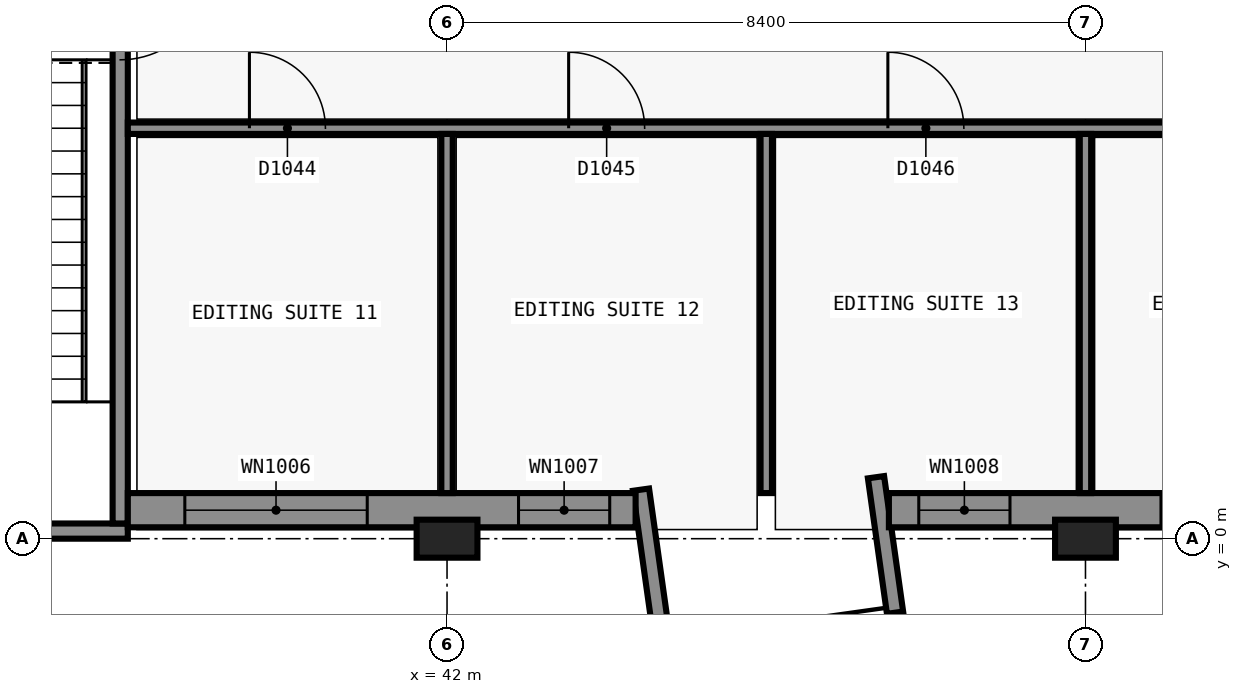
"""IFC4 building model, lengths in metres.
Left out: names, types, materials, properties, quantities, classifications, styles, units other than length and angle.
Written with IfcOpenShell. Run it as: python <this file> out.ifc"""

import sys

from ifc_helpers import new_model, si_unit, direction, frame, frame_2d, origin, origin_2d, place, context, subcontext, project, spatial, rectangle, extrude, element, fill, save


model = new_model("IFC4")
c1 = context("Model", 3, precision=1e-05, world=origin(), true_north=direction((0.0, 1.0)))
c2 = subcontext(c1, "Body", "Model", "MODEL_VIEW")
j1 = project(units=[si_unit("LENGTHUNIT", "METRE"), si_unit("PLANEANGLEUNIT", "RADIAN")], contexts=[c1])
p1 = place(None, origin())
s1 = spatial("IfcSite", under=j1, at=p1, CompositionType="ELEMENT")
p2 = place(p1, origin())
s2 = spatial("IfcBuilding", under=s1, at=p2, CompositionType="ELEMENT")
p3 = place(p2, frame((0.0, 0.0, 5.4)))
s3 = spatial("IfcBuildingStorey", under=s2, at=p3, CompositionType="ELEMENT", Elevation=5.4)
p4 = place(p3, frame((37.8, 0.1, 0.0), z_axis=(0.0, 0.0, 1.0), x_axis=(-1.0, 0.0, 0.0)))
e1 = element("IfcWall", 1, at=p4, inside=s3, PredefinedType="SHEAR", context=c2, shape_type="SweptSolid", body=[
    extrude(rectangle(XDim=3.9, YDim=0.2, at=frame_2d((1.95, 0.0))), origin(), (0.0, 0.0, 1.0), 4.8),
])
p5 = place(p3, frame((37.7, 8.4, 0.0), z_axis=(0.0, 0.0, 1.0), x_axis=(0.0, -1.0, 0.0)))
e2 = element("IfcWall", 2, at=p5, inside=s3, PredefinedType="SHEAR", context=c2, shape_type="SweptSolid", body=[
    extrude(rectangle(XDim=8.2, YDim=0.2, at=frame_2d((4.1, 0.0))), origin(), (0.0, 0.0, 1.0), 4.8),
])
p6 = place(p5, frame((0.9, 0.0, 0.0)))
e3 = element("IfcOpeningElement", 3, at=p6, cuts=e2, PredefinedType="OPENING", context=c2, shape_type="SweptSolid", body=[
    extrude(rectangle(XDim=1.2, YDim=2.1, at=frame_2d((0.6, 1.05))), frame((0.0, 0.11, 0.0), z_axis=(0.0, -1.0, 0.0), x_axis=(1.0, 0.0, 0.0)), (0.0, 0.0, 1.0), 0.22),
])
for number, where, z_axis, x_axis in (
    (4, (42.0, 0.0, 0.0), (0.0, 0.0, 1.0), (1.0, 0.0, 0.0)),
    (5, (50.4, 0.0, 0.0), (0.0, 0.0, 1.0), (1.0, 0.0, 0.0)),
):
    element("IfcColumn", number, at=place(p3, frame(where, z_axis=z_axis, x_axis=x_axis)), inside=s3, PredefinedType="COLUMN", context=c2, shape_type="SweptSolid", body=[
        extrude(rectangle(XDim=0.8, YDim=0.5, at=origin_2d()), origin(), (0.0, 0.0, 1.0), 4.8),
    ])
p7 = place(p3, frame((44.552, 0.645, 0.0), z_axis=(0.0, 0.0, 1.0), x_axis=(0.139173441018, -0.990268020949, 0.0)))
e6 = element("IfcWall", 6, at=p7, inside=s3, PredefinedType="SOLIDWALL", context=c2, shape_type="SweptSolid", body=[
    extrude(rectangle(XDim=2.068, YDim=0.215, at=frame_2d((1.034, 0.0))), origin(), (0.0, 0.0, 1.0), 4.5),
])
p8 = place(p3, frame((47.644, 0.809, 0.0), z_axis=(0.0, 0.0, 1.0), x_axis=(0.139161311926, -0.990269725511, 0.0)))
e7 = element("IfcWall", 7, at=p8, inside=s3, PredefinedType="SOLIDWALL", context=c2, shape_type="SweptSolid", body=[
    extrude(rectangle(XDim=1.8, YDim=0.215, at=frame_2d((0.9, 0.0))), origin(), (0.0, 0.0, 1.0), 4.5),
])
p9 = place(p3, frame((44.481, 0.375, 0.0), z_axis=(0.0, 0.0, 1.0), x_axis=(-1.0, 0.0, 0.0)))
e8 = element("IfcWall", 8, at=p9, inside=s3, PredefinedType="SOLIDWALL", context=c2, shape_type="SweptSolid", body=[
    extrude(rectangle(XDim=6.681, YDim=0.45, at=frame_2d((3.341, 0.0))), origin(), (0.0, 0.0, 1.0), 4.5),
])
p10 = place(p9, frame((3.531, 0.0, 0.9)))
e9 = element("IfcOpeningElement", 9, at=p10, cuts=e8, PredefinedType="OPENING", context=c2, shape_type="SweptSolid", body=[
    extrude(rectangle(XDim=2.4, YDim=1.5, at=frame_2d((1.2, 0.75))), frame((0.0, 0.235, 0.0), z_axis=(0.0, -1.0, 0.0), x_axis=(1.0, 0.0, 0.0)), (0.0, 0.0, 1.0), 0.47),
])
p11 = place(p9, frame((0.341, 0.0, 0.9)))
e10 = element("IfcOpeningElement", 10, at=p11, cuts=e8, PredefinedType="OPENING", context=c2, shape_type="SweptSolid", body=[
    extrude(rectangle(XDim=1.2, YDim=1.5, at=frame_2d((0.6, 0.75))), frame((0.0, 0.235, 0.0), z_axis=(0.0, -1.0, 0.0), x_axis=(1.0, 0.0, 0.0)), (0.0, 0.0, 1.0), 0.47),
])
p12 = place(p3, frame((52.987, 0.375, 0.0), z_axis=(0.0, 0.0, 1.0), x_axis=(-1.0, 0.0, 0.0)))
e11 = element("IfcWall", 11, at=p12, inside=s3, PredefinedType="SOLIDWALL", context=c2, shape_type="SweptSolid", body=[
    extrude(rectangle(XDim=5.173, YDim=0.45, at=frame_2d((2.586, 0.0))), origin(), (0.0, 0.0, 1.0), 4.5),
])
p13 = place(p12, frame((3.58, 0.0, 0.9)))
e12 = element("IfcOpeningElement", 12, at=p13, cuts=e11, PredefinedType="OPENING", context=c2, shape_type="SweptSolid", body=[
    extrude(rectangle(XDim=1.2, YDim=1.5, at=frame_2d((0.6, 0.75))), frame((0.0, 0.235, 0.0), z_axis=(0.0, -1.0, 0.0), x_axis=(1.0, 0.0, 0.0)), (0.0, 0.0, 1.0), 0.47),
])
p14 = place(p12, frame((0.393, 0.0, 0.9)))
e13 = element("IfcOpeningElement", 13, at=p14, cuts=e11, PredefinedType="OPENING", context=c2, shape_type="SweptSolid", body=[
    extrude(rectangle(XDim=1.2, YDim=1.5, at=frame_2d((0.6, 0.75))), frame((0.0, 0.235, 0.0), z_axis=(0.0, -1.0, 0.0), x_axis=(1.0, 0.0, 0.0)), (0.0, 0.0, 1.0), 0.47),
])
p15 = place(p3, frame((37.8, 5.4, 0.0), z_axis=(0.0, 0.0, 1.0), x_axis=(1.0, 0.0, 0.0)))
e14 = element("IfcWall", 14, at=p15, inside=s3, PredefinedType="PARTITIONING", context=c2, shape_type="SweptSolid", body=[
    extrude(rectangle(XDim=20.3, YDim=0.15, at=frame_2d((10.15, 0.0))), origin(), (0.0, 0.0, 1.0), 3.8),
])
p16 = place(p15, frame((1.6, 0.0, 0.0)))
e15 = element("IfcOpeningElement", 15, at=p16, cuts=e14, PredefinedType="OPENING", context=c2, shape_type="SweptSolid", body=[
    extrude(rectangle(XDim=1.0, YDim=2.1, at=frame_2d((0.5, 1.05))), frame((0.0, 0.085, 0.0), z_axis=(0.0, -1.0, 0.0), x_axis=(1.0, 0.0, 0.0)), (0.0, 0.0, 1.0), 0.17),
])
p17 = place(p15, frame((5.8, 0.0, 0.0)))
e16 = element("IfcOpeningElement", 16, at=p17, cuts=e14, PredefinedType="OPENING", context=c2, shape_type="SweptSolid", body=[
    extrude(rectangle(XDim=1.0, YDim=2.1, at=frame_2d((0.5, 1.05))), frame((0.0, 0.085, 0.0), z_axis=(0.0, -1.0, 0.0), x_axis=(1.0, 0.0, 0.0)), (0.0, 0.0, 1.0), 0.17),
])
p18 = place(p15, frame((10.0, 0.0, 0.0)))
e17 = element("IfcOpeningElement", 17, at=p18, cuts=e14, PredefinedType="OPENING", context=c2, shape_type="SweptSolid", body=[
    extrude(rectangle(XDim=1.0, YDim=2.1, at=frame_2d((0.5, 1.05))), frame((0.0, 0.085, 0.0), z_axis=(0.0, -1.0, 0.0), x_axis=(1.0, 0.0, 0.0)), (0.0, 0.0, 1.0), 0.17),
])
p19 = place(p15, frame((14.2, 0.0, 0.0)))
e18 = element("IfcOpeningElement", 18, at=p19, cuts=e14, PredefinedType="OPENING", context=c2, shape_type="SweptSolid", body=[
    extrude(rectangle(XDim=1.0, YDim=2.1, at=frame_2d((0.5, 1.05))), frame((0.0, 0.085, 0.0), z_axis=(0.0, -1.0, 0.0), x_axis=(1.0, 0.0, 0.0)), (0.0, 0.0, 1.0), 0.17),
])
p20 = place(p15, frame((18.4, 0.0, 0.0)))
e19 = element("IfcOpeningElement", 19, at=p20, cuts=e14, PredefinedType="OPENING", context=c2, shape_type="SweptSolid", body=[
    extrude(rectangle(XDim=1.0, YDim=2.1, at=frame_2d((0.5, 1.05))), frame((0.0, 0.085, 0.0), z_axis=(0.0, -1.0, 0.0), x_axis=(1.0, 0.0, 0.0)), (0.0, 0.0, 1.0), 0.17),
])
p21 = place(p3, frame((42.0, 0.6, 0.0), z_axis=(0.0, 0.0, 1.0), x_axis=(0.0, 1.0, 0.0)))
e20 = element("IfcWall", 20, at=p21, inside=s3, PredefinedType="PARTITIONING", context=c2, shape_type="SweptSolid", body=[
    extrude(rectangle(XDim=4.725, YDim=0.15, at=frame_2d((2.362, 0.0))), origin(), (0.0, 0.0, 1.0), 3.8),
])
p22 = place(p3, frame((46.2, 0.6, 0.0), z_axis=(0.0, 0.0, 1.0), x_axis=(0.0, 1.0, 0.0)))
e21 = element("IfcWall", 21, at=p22, inside=s3, PredefinedType="PARTITIONING", context=c2, shape_type="SweptSolid", body=[
    extrude(rectangle(XDim=4.725, YDim=0.15, at=frame_2d((2.362, 0.0))), origin(), (0.0, 0.0, 1.0), 4.5),
])
p23 = place(p3, frame((50.4, 0.6, 0.0), z_axis=(0.0, 0.0, 1.0), x_axis=(0.0, 1.0, 0.0)))
e22 = element("IfcWall", 22, at=p23, inside=s3, PredefinedType="PARTITIONING", context=c2, shape_type="SweptSolid", body=[
    extrude(rectangle(XDim=4.725, YDim=0.15, at=frame_2d((2.362, 0.0))), origin(), (0.0, 0.0, 1.0), 3.8),
])
p24 = place(p10, origin())
e23 = element("IfcWindow", 23, at=p24, inside=s3, PartitioningType="SINGLE_PANEL", PredefinedType="WINDOW", context=c2, shape_type="SweptSolid", body=[
    extrude(rectangle(XDim=2.4, YDim=1.5, at=frame_2d((1.2, 0.75))), frame((0.0, 0.03, 0.0), z_axis=(0.0, -1.0, 0.0), x_axis=(1.0, 0.0, 0.0)), (0.0, 0.0, 1.0), 0.06),
])
fill(e9, e23)
p25 = place(p11, origin())
e24 = element("IfcWindow", 24, at=p25, inside=s3, PartitioningType="SINGLE_PANEL", PredefinedType="WINDOW", context=c2, shape_type="SweptSolid", body=[
    extrude(rectangle(XDim=1.2, YDim=1.5, at=frame_2d((0.6, 0.75))), frame((0.0, 0.03, 0.0), z_axis=(0.0, -1.0, 0.0), x_axis=(1.0, 0.0, 0.0)), (0.0, 0.0, 1.0), 0.06),
])
fill(e10, e24)
p26 = place(p13, origin())
e25 = element("IfcWindow", 25, at=p26, inside=s3, PartitioningType="SINGLE_PANEL", PredefinedType="WINDOW", context=c2, shape_type="SweptSolid", body=[
    extrude(rectangle(XDim=1.2, YDim=1.5, at=frame_2d((0.6, 0.75))), frame((0.0, 0.03, 0.0), z_axis=(0.0, -1.0, 0.0), x_axis=(1.0, 0.0, 0.0)), (0.0, 0.0, 1.0), 0.06),
])
fill(e12, e25)
p27 = place(p14, origin())
e26 = element("IfcWindow", 26, at=p27, inside=s3, PartitioningType="SINGLE_PANEL", PredefinedType="WINDOW", context=c2, shape_type="SweptSolid", body=[
    extrude(rectangle(XDim=1.2, YDim=1.5, at=frame_2d((0.6, 0.75))), frame((0.0, 0.03, 0.0), z_axis=(0.0, -1.0, 0.0), x_axis=(1.0, 0.0, 0.0)), (0.0, 0.0, 1.0), 0.06),
])
fill(e13, e26)
p28 = place(p6, origin())
e27 = element("IfcDoor", 27, at=p28, inside=s3, OperationType="SINGLE_SWING_RIGHT", PredefinedType="DOOR", context=c2, shape_type="SweptSolid", body=[
    extrude(rectangle(XDim=1.2, YDim=2.1, at=frame_2d((0.6, 1.05))), frame((0.0, 0.025, 0.0), z_axis=(0.0, -1.0, 0.0), x_axis=(1.0, 0.0, 0.0)), (0.0, 0.0, 1.0), 0.05),
])
fill(e3, e27)
p29 = place(p16, origin())
e28 = element("IfcDoor", 28, at=p29, inside=s3, OperationType="SINGLE_SWING_RIGHT", PredefinedType="DOOR", context=c2, shape_type="SweptSolid", body=[
    extrude(rectangle(XDim=1.0, YDim=2.1, at=frame_2d((0.5, 1.05))), frame((0.0, 0.025, 0.0), z_axis=(0.0, -1.0, 0.0), x_axis=(1.0, 0.0, 0.0)), (0.0, 0.0, 1.0), 0.05),
])
fill(e15, e28)
p30 = place(p17, origin())
e29 = element("IfcDoor", 29, at=p30, inside=s3, OperationType="SINGLE_SWING_RIGHT", PredefinedType="DOOR", context=c2, shape_type="SweptSolid", body=[
    extrude(rectangle(XDim=1.0, YDim=2.1, at=frame_2d((0.5, 1.05))), frame((0.0, 0.025, 0.0), z_axis=(0.0, -1.0, 0.0), x_axis=(1.0, 0.0, 0.0)), (0.0, 0.0, 1.0), 0.05),
])
fill(e16, e29)
p31 = place(p18, origin())
e30 = element("IfcDoor", 30, at=p31, inside=s3, OperationType="SINGLE_SWING_LEFT", PredefinedType="DOOR", context=c2, shape_type="SweptSolid", body=[
    extrude(rectangle(XDim=1.0, YDim=2.1, at=frame_2d((0.5, 1.05))), frame((0.0, 0.025, 0.0), z_axis=(0.0, -1.0, 0.0), x_axis=(1.0, 0.0, 0.0)), (0.0, 0.0, 1.0), 0.05),
])
fill(e17, e30)
save(model, sys.argv[1])
